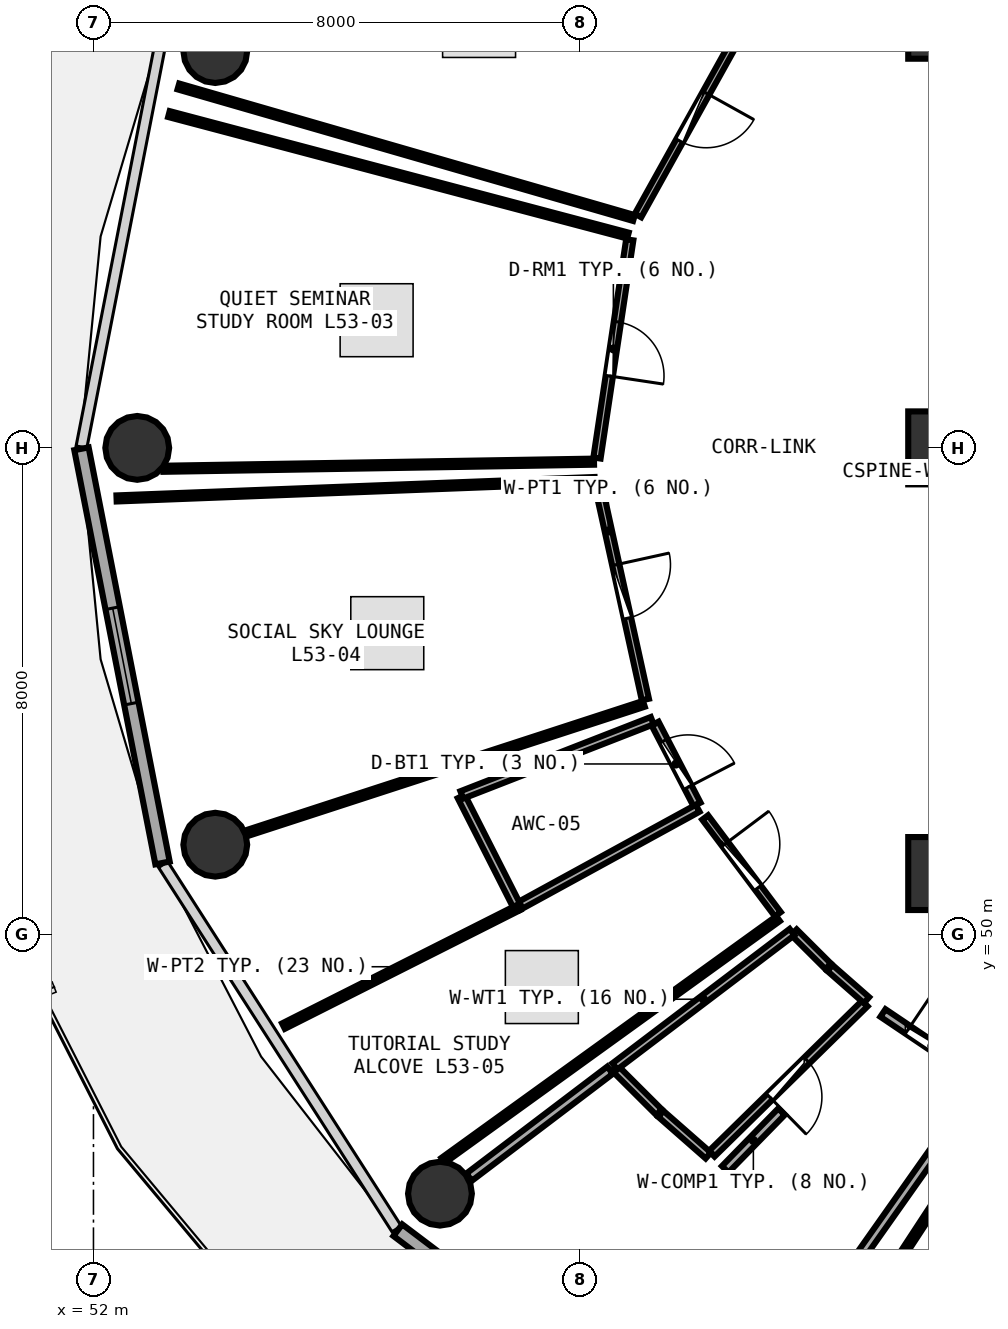
"""IFC4 building model, lengths in metres.
Left out: names, types, materials, properties, quantities, classifications, styles, units other than length and angle.
Written with IfcOpenShell. Run it as: python <this file> out.ifc"""

import sys

from ifc_helpers import new_model, si_unit, direction, frame, frame_2d, origin, origin_2d, place, context, subcontext, project, spatial, rectangle, circle, extrude, element, fill, save


model = new_model("IFC4")
c1 = context("Model", 3, precision=1e-05, world=origin(), true_north=direction((0.0, 1.0)))
c2 = subcontext(c1, "Body", "Model", "MODEL_VIEW")
j1 = project(units=[si_unit("LENGTHUNIT", "METRE"), si_unit("PLANEANGLEUNIT", "RADIAN")], contexts=[c1])
p1 = place(None, origin())
s1 = spatial("IfcSite", under=j1, at=p1, CompositionType="ELEMENT")
p2 = place(p1, origin())
s2 = spatial("IfcBuilding", under=s1, at=p2, CompositionType="ELEMENT")
p3 = place(p2, frame((0.0, 0.0, 208.2)))
s3 = spatial("IfcBuildingStorey", under=s2, at=p3, CompositionType="ELEMENT", Elevation=208.2)
for number, where, z_axis, x_axis in (
    (1, (66.0, 51.0, 0.0), (0.0, 0.0, 1.0), (1.0, 0.0, 0.0)),
    (2, (66.0, 65.0, 0.0), (0.0, 0.0, 1.0), (1.0, 0.0, 0.0)),
    (3, (66.0, 58.0, 0.0), (0.0, 0.0, 1.0), (1.0, 0.0, 0.0)),
):
    element("IfcColumn", number, at=place(p3, frame(where, z_axis=z_axis, x_axis=x_axis)), inside=s3, PredefinedType="PILASTER", context=c2, shape_type="SweptSolid", body=[
        extrude(rectangle(XDim=1.2, YDim=1.2, at=origin_2d()), origin(), (0.0, 0.0, 1.0), 3.75),
    ])
for number, where, z_axis, x_axis in (
    (4, (54.003, 64.526, 0.0), (0.0, 0.0, 1.0), (1.0, 0.0, 0.0)),
    (5, (52.72, 58.0, 0.0), (0.0, 0.0, 1.0), (1.0, 0.0, 0.0)),
    (6, (54.003, 51.474, 0.0), (0.0, 0.0, 1.0), (1.0, 0.0, 0.0)),
    (7, (57.698, 45.736, 0.0), (0.0, 0.0, 1.0), (1.0, 0.0, 0.0)),
):
    element("IfcColumn", number, at=place(p3, frame(where, z_axis=z_axis, x_axis=x_axis)), inside=s3, PredefinedType="COLUMN", context=c2, shape_type="SweptSolid", body=[
        extrude(circle(Radius=0.525, at=origin_2d()), origin(), (0.0, 0.0, 1.0), 3.75),
    ])
p4 = place(p3, frame((51.803, 57.985, 0.0), z_axis=(0.0, 0.0, 1.0), x_axis=(0.192069055673, -0.981381413036, 0.0)))
e8 = element("IfcWall", 8, at=p4, inside=s3, PredefinedType="SOLIDWALL", context=c2, shape_type="SweptSolid", body=[
    extrude(rectangle(XDim=6.94, YDim=0.24, at=frame_2d((3.47, 0.0))), origin(), (0.0, 0.0, 1.0), 3.475),
])
p5 = place(p4, frame((2.67, 0.0, 0.85)))
e9 = element("IfcOpeningElement", 9, at=p5, cuts=e8, PredefinedType="OPENING", context=c2, shape_type="SweptSolid", body=[
    extrude(rectangle(XDim=1.6, YDim=1.45, at=frame_2d((0.8, 0.725))), frame((0.0, 0.13, 0.0), z_axis=(0.0, -1.0, 0.0), x_axis=(1.0, 0.0, 0.0)), (0.0, 0.0, 1.0), 0.26),
])
p6 = place(p3, frame((57.006, 45.135, 0.0), z_axis=(0.0, 0.0, 1.0), x_axis=(0.797701674595, -0.603052268338, 0.0)))
e10 = element("IfcWall", 10, at=p6, inside=s3, PredefinedType="SOLIDWALL", context=c2, shape_type="SweptSolid", body=[
    extrude(rectangle(XDim=7.374, YDim=0.24, at=frame_2d((3.687, 0.0))), origin(), (0.0, 0.0, 1.0), 3.475),
])
p7 = place(p6, frame((2.887, 0.0, 0.85)))
e11 = element("IfcOpeningElement", 11, at=p7, cuts=e10, PredefinedType="OPENING", context=c2, shape_type="SweptSolid", body=[
    extrude(rectangle(XDim=1.6, YDim=1.45, at=frame_2d((0.8, 0.725))), frame((0.0, 0.13, 0.0), z_axis=(0.0, -1.0, 0.0), x_axis=(1.0, 0.0, 0.0)), (0.0, 0.0, 1.0), 0.26),
])
p8 = place(p3, frame((62.759, 65.064, 0.0), z_axis=(0.0, 0.0, 1.0), x_axis=(-0.485877595764, -0.874026865683, 0.0)))
e12 = element("IfcWall", 12, at=p8, inside=s3, PredefinedType="PARTITIONING", context=c2, shape_type="SweptSolid", body=[
    extrude(rectangle(XDim=3.71, YDim=0.12, at=frame_2d((1.855, 0.0))), origin(), (0.0, 0.0, 1.0), 3.025),
])
p9 = place(p8, frame((1.405, 0.0, 0.0)))
e13 = element("IfcOpeningElement", 13, at=p9, cuts=e12, PredefinedType="OPENING", context=c2, shape_type="SweptSolid", body=[
    extrude(rectangle(XDim=0.9, YDim=2.08, at=frame_2d((0.45, 1.04))), frame((0.0, 0.07, 0.0), z_axis=(0.0, -1.0, 0.0), x_axis=(1.0, 0.0, 0.0)), (0.0, 0.0, 1.0), 0.14),
])
p10 = place(p3, frame((60.82, 61.422, 0.0), z_axis=(0.0, 0.0, 1.0), x_axis=(-0.148557592641, -0.988903757536, 0.0)))
e14 = element("IfcWall", 14, at=p10, inside=s3, PredefinedType="PARTITIONING", context=c2, shape_type="SweptSolid", body=[
    extrude(rectangle(XDim=3.629, YDim=0.12, at=frame_2d((1.814, 0.0))), origin(), (0.0, 0.0, 1.0), 3.025),
])
p11 = place(p10, frame((1.364, 0.0, 0.0)))
e15 = element("IfcOpeningElement", 15, at=p11, cuts=e14, PredefinedType="OPENING", context=c2, shape_type="SweptSolid", body=[
    extrude(rectangle(XDim=0.9, YDim=2.08, at=frame_2d((0.45, 1.04))), frame((0.0, 0.07, 0.0), z_axis=(0.0, -1.0, 0.0), x_axis=(1.0, 0.0, 0.0)), (0.0, 0.0, 1.0), 0.14),
])
p12 = place(p3, frame((60.296, 57.414, 0.0), z_axis=(0.0, 0.0, 1.0), x_axis=(0.214769597133, -0.976664742963, 0.0)))
e16 = element("IfcWall", 16, at=p12, inside=s3, PredefinedType="PARTITIONING", context=c2, shape_type="SweptSolid", body=[
    extrude(rectangle(XDim=3.638, YDim=0.12, at=frame_2d((1.819, 0.0))), origin(), (0.0, 0.0, 1.0), 3.48),
])
p13 = place(p12, frame((1.369, 0.0, 0.0)))
e17 = element("IfcOpeningElement", 17, at=p13, cuts=e16, PredefinedType="OPENING", context=c2, shape_type="SweptSolid", body=[
    extrude(rectangle(XDim=0.9, YDim=2.08, at=frame_2d((0.45, 1.04))), frame((0.0, 0.07, 0.0), z_axis=(0.0, -1.0, 0.0), x_axis=(1.0, 0.0, 0.0)), (0.0, 0.0, 1.0), 0.14),
])
p14 = place(p3, frame((61.236, 53.468, 0.0), z_axis=(0.0, 0.0, 1.0), x_axis=(0.460573669508, -0.887621481802, 0.0)))
e18 = element("IfcWall", 18, at=p14, inside=s3, PredefinedType="PLUMBINGWALL", context=c2, shape_type="SweptSolid", body=[
    extrude(rectangle(XDim=1.5, YDim=0.13, at=frame_2d((0.75, 0.0))), origin(), (0.0, 0.0, 1.0), 3.235),
])
p15 = place(p14, frame((0.32, 0.0, 0.0)))
e19 = element("IfcOpeningElement", 19, at=p15, cuts=e18, PredefinedType="OPENING", context=c2, shape_type="SweptSolid", body=[
    extrude(rectangle(XDim=0.86, YDim=2.05, at=frame_2d((0.43, 1.025))), frame((0.0, 0.075, 0.0), z_axis=(0.0, -1.0, 0.0), x_axis=(1.0, 0.0, 0.0)), (0.0, 0.0, 1.0), 0.15),
])
p16 = place(p3, frame((62.06, 51.922, 0.0), z_axis=(0.0, 0.0, 1.0), x_axis=(0.600647163637, -0.799514218019, 0.0)))
e20 = element("IfcWall", 20, at=p16, inside=s3, PredefinedType="PARTITIONING", context=c2, shape_type="SweptSolid", body=[
    extrude(rectangle(XDim=1.991, YDim=0.12, at=frame_2d((0.996, 0.0))), origin(), (0.0, 0.0, 1.0), 3.025),
])
p17 = place(p16, frame((0.546, 0.0, 0.0)))
e21 = element("IfcOpeningElement", 21, at=p17, cuts=e20, PredefinedType="OPENING", context=c2, shape_type="SweptSolid", body=[
    extrude(rectangle(XDim=0.9, YDim=2.08, at=frame_2d((0.45, 1.04))), frame((0.0, 0.07, 0.0), z_axis=(0.0, -1.0, 0.0), x_axis=(1.0, 0.0, 0.0)), (0.0, 0.0, 1.0), 0.14),
])
p18 = place(p3, frame((64.686, 48.863, 0.0), z_axis=(0.0, 0.0, 1.0), x_axis=(-0.713685369918, -0.700466410875, 0.0)))
e22 = element("IfcWall", 22, at=p18, inside=s3, PredefinedType="PLUMBINGWALL", context=c2, shape_type="SweptSolid", body=[
    extrude(rectangle(XDim=3.528, YDim=0.13, at=frame_2d((1.764, 0.0))), origin(), (0.0, 0.0, 1.0), 3.175),
])
p19 = place(p18, frame((1.334, 0.0, 0.0)))
e23 = element("IfcOpeningElement", 23, at=p19, cuts=e22, PredefinedType="OPENING", context=c2, shape_type="SweptSolid", body=[
    extrude(rectangle(XDim=0.86, YDim=2.05, at=frame_2d((0.43, 1.025))), frame((0.0, 0.075, 0.0), z_axis=(0.0, -1.0, 0.0), x_axis=(1.0, 0.0, 0.0)), (0.0, 0.0, 1.0), 0.15),
])
p20 = place(p3, frame((64.984, 48.707, 0.0), z_axis=(0.0, 0.0, 1.0), x_axis=(0.829408373073, -0.558642775553, 0.0)))
e24 = element("IfcWall", 24, at=p20, inside=s3, PredefinedType="PARTITIONING", context=c2, shape_type="SweptSolid", body=[
    extrude(rectangle(XDim=1.94, YDim=0.15, at=frame_2d((0.97, 0.0))), origin(), (0.0, 0.0, 1.0), 3.025),
])
p21 = place(p20, frame((0.495, 0.0, 0.0)))
e25 = element("IfcOpeningElement", 25, at=p21, cuts=e24, PredefinedType="OPENING", context=c2, shape_type="SweptSolid", body=[
    extrude(rectangle(XDim=0.95, YDim=2.08, at=frame_2d((0.475, 1.04))), frame((0.0, 0.085, 0.0), z_axis=(0.0, -1.0, 0.0), x_axis=(1.0, 0.0, 0.0)), (0.0, 0.0, 1.0), 0.17),
])
p22 = place(p3, frame((63.514, 42.004, 0.0), z_axis=(0.0, 0.0, 1.0), x_axis=(0.547776057645, 0.836625000028, 0.0)))
e26 = element("IfcWall", 26, at=p22, inside=s3, PredefinedType="PARTITIONING", context=c2, shape_type="SweptSolid", body=[
    extrude(rectangle(XDim=6.381, YDim=0.1, at=frame_2d((3.19, 0.0))), origin(), (0.0, 0.0, 1.0), 3.025),
])
p23 = place(p3, frame((60.889, 61.78, 0.0), z_axis=(0.0, 0.0, 1.0), x_axis=(-0.960734399679, 0.277469661899, 0.0)))
e27 = element("IfcWall", 27, at=p23, inside=s3, PredefinedType="PARTITIONING", context=c2, shape_type="SweptSolid", body=[
    extrude(rectangle(XDim=7.798, YDim=0.1, at=frame_2d((3.899, 0.0))), origin(), (0.0, 0.0, 1.0), 3.075),
])
p24 = place(p3, frame((60.232, 57.773, 0.0), z_axis=(0.0, 0.0, 1.0), x_axis=(-0.999864271248, -0.016475408379, 0.0)))
e28 = element("IfcWall", 28, at=p24, inside=s3, PredefinedType="PARTITIONING", context=c2, shape_type="SweptSolid", body=[
    extrude(rectangle(XDim=7.083, YDim=0.1, at=frame_2d((3.542, 0.0))), origin(), (0.0, 0.0, 1.0), 3.175),
])
p25 = place(p3, frame((53.241, 63.49, 0.0), z_axis=(0.0, 0.0, 1.0), x_axis=(0.966701361123, -0.25590716755, 0.0)))
e29 = element("IfcWall", 29, at=p25, inside=s3, PredefinedType="PARTITIONING", context=c2, shape_type="SweptSolid", body=[
    extrude(rectangle(XDim=7.81, YDim=0.1, at=frame_2d((3.905, 0.0))), origin(), (0.0, 0.0, 1.0), 3.075),
])
p26 = place(p3, frame((61.052, 53.791, 0.0), z_axis=(0.0, 0.0, 1.0), x_axis=(-0.950863645771, -0.309609959708, 0.0)))
e30 = element("IfcWall", 30, at=p26, inside=s3, PredefinedType="PARTITIONING", context=c2, shape_type="SweptSolid", body=[
    extrude(rectangle(XDim=6.87, YDim=0.1, at=frame_2d((3.435, 0.0))), origin(), (0.0, 0.0, 1.0), 3.175),
])
p27 = place(p3, frame((52.38, 57.168, 0.0), z_axis=(0.0, 0.0, 1.0), x_axis=(0.999258468257, 0.038503423452, 0.0)))
e31 = element("IfcWall", 31, at=p27, inside=s3, PredefinedType="PARTITIONING", context=c2, shape_type="SweptSolid", body=[
    extrude(rectangle(XDim=7.869, YDim=0.1, at=frame_2d((3.935, 0.0))), origin(), (0.0, 0.0, 1.0), 3.075),
])
p28 = place(p3, frame((61.937, 52.073, 0.0), z_axis=(0.0, 0.0, 1.0), x_axis=(-0.877295143091, -0.479951280767, 0.0)))
e32 = element("IfcWall", 32, at=p28, inside=s3, PredefinedType="PLUMBINGWALL", context=c2, shape_type="SweptSolid", body=[
    extrude(rectangle(XDim=3.36, YDim=0.13, at=frame_2d((1.68, 0.0))), origin(), (0.0, 0.0, 1.0), 3.025),
])
p29 = place(p3, frame((58.962, 50.469, 0.0), z_axis=(0.0, 0.0, 1.0), x_axis=(-0.452384505313, 0.891822997771, 0.0)))
e33 = element("IfcWall", 33, at=p29, inside=s3, PredefinedType="PLUMBINGWALL", context=c2, shape_type="SweptSolid", body=[
    extrude(rectangle(XDim=2.018, YDim=0.13, at=frame_2d((1.009, 0.0))), origin(), (0.0, 0.0, 1.0), 3.025),
])
p30 = place(p3, frame((58.059, 52.293, 0.0), z_axis=(0.0, 0.0, 1.0), x_axis=(0.931712585556, 0.363196445352, 0.0)))
e34 = element("IfcWall", 34, at=p30, inside=s3, PredefinedType="PLUMBINGWALL", context=c2, shape_type="SweptSolid", body=[
    extrude(rectangle(XDim=3.36, YDim=0.13, at=frame_2d((1.68, 0.0))), origin(), (0.0, 0.0, 1.0), 3.175),
])
p31 = place(p3, frame((63.26, 50.259, 0.0), z_axis=(0.0, 0.0, 1.0), x_axis=(-0.810850730514, -0.585253016076, 0.0)))
e35 = element("IfcWall", 35, at=p31, inside=s3, PredefinedType="PARTITIONING", context=c2, shape_type="SweptSolid", body=[
    extrude(rectangle(XDim=6.793, YDim=0.1, at=frame_2d((3.396, 0.0))), origin(), (0.0, 0.0, 1.0), 3.175),
])
p32 = place(p3, frame((55.125, 48.491, 0.0), z_axis=(0.0, 0.0, 1.0), x_axis=(0.892902240534, 0.450250584507, 0.0)))
e36 = element("IfcWall", 36, at=p32, inside=s3, PredefinedType="PARTITIONING", context=c2, shape_type="SweptSolid", body=[
    extrude(rectangle(XDim=4.337, YDim=0.1, at=frame_2d((2.169, 0.0))), origin(), (0.0, 0.0, 1.0), 3.075),
])
p33 = place(p3, frame((63.519, 50.036, 0.0), z_axis=(0.0, 0.0, 1.0), x_axis=(0.708179895313, -0.706032036012, 0.0)))
e37 = element("IfcWall", 37, at=p33, inside=s3, PredefinedType="PLUMBINGWALL", context=c2, shape_type="SweptSolid", body=[
    extrude(rectangle(XDim=0.796, YDim=0.13, at=frame_2d((0.398, 0.0))), origin(), (0.0, 0.0, 1.0), 3.025),
])
p34 = place(p3, frame((64.112, 49.447, 0.0), z_axis=(0.0, 0.0, 1.0), x_axis=(0.751480759656, -0.659755005943, 0.0)))
e38 = element("IfcWall", 38, at=p34, inside=s3, PredefinedType="PLUMBINGWALL", context=c2, shape_type="SweptSolid", body=[
    extrude(rectangle(XDim=0.801, YDim=0.13, at=frame_2d((0.401, 0.0))), origin(), (0.0, 0.0, 1.0), 3.48),
])
p35 = place(p3, frame((62.111, 46.363, 0.0), z_axis=(0.0, 0.0, 1.0), x_axis=(-0.751599507382, 0.659619724162, 0.0)))
e39 = element("IfcWall", 39, at=p35, inside=s3, PredefinedType="PLUMBINGWALL", context=c2, shape_type="SweptSolid", body=[
    extrude(rectangle(XDim=1.038, YDim=0.13, at=frame_2d((0.519, 0.0))), origin(), (0.0, 0.0, 1.0), 3.48),
])
p36 = place(p3, frame((61.302, 47.075, 0.0), z_axis=(0.0, 0.0, 1.0), x_axis=(-0.707936648292, 0.706275938996, 0.0)))
e40 = element("IfcWall", 40, at=p36, inside=s3, PredefinedType="PLUMBINGWALL", context=c2, shape_type="SweptSolid", body=[
    extrude(rectangle(XDim=1.029, YDim=0.13, at=frame_2d((0.515, 0.0))), origin(), (0.0, 0.0, 1.0), 3.025),
])
p37 = place(p3, frame((60.575, 47.828, 0.0), z_axis=(0.0, 0.0, 1.0), x_axis=(0.79681650582, 0.604221363453, 0.0)))
e41 = element("IfcWall", 41, at=p37, inside=s3, PredefinedType="PLUMBINGWALL", context=c2, shape_type="SweptSolid", body=[
    extrude(rectangle(XDim=3.657, YDim=0.13, at=frame_2d((1.829, 0.0))), origin(), (0.0, 0.0, 1.0), 3.175),
])
p38 = place(p3, frame((66.62, 47.556, 0.0), z_axis=(0.0, 0.0, 1.0), x_axis=(-0.576552043051, -0.817060427174, 0.0)))
e42 = element("IfcWall", 42, at=p38, inside=s3, PredefinedType="PARTITIONING", context=c2, shape_type="SweptSolid", body=[
    extrude(rectangle(XDim=7.309, YDim=0.15, at=frame_2d((3.654, 0.0))), origin(), (0.0, 0.0, 1.0), 3.025),
])
p39 = place(p3, frame((58.177, 46.007, 0.0), z_axis=(0.0, 0.0, 1.0), x_axis=(0.796666201995, 0.604419525329, 0.0)))
e43 = element("IfcWall", 43, at=p39, inside=s3, PredefinedType="PARTITIONING", context=c2, shape_type="SweptSolid", body=[
    extrude(rectangle(XDim=2.911, YDim=0.15, at=frame_2d((1.455, 0.0))), origin(), (0.0, 0.0, 1.0), 3.025),
])
p40 = place(p3, frame((62.39, 46.137, 0.0), z_axis=(0.0, 0.0, 1.0), x_axis=(0.699044346204, 0.715078318816, 0.0)))
e44 = element("IfcWall", 44, at=p40, inside=s3, PredefinedType="PARTITIONING", context=c2, shape_type="SweptSolid", body=[
    extrude(rectangle(XDim=1.325, YDim=0.15, at=frame_2d((0.662, 0.0))), origin(), (0.0, 0.0, 1.0), 3.175),
])
p41 = place(p5, origin())
e45 = element("IfcWindow", 45, at=p41, inside=s3, PartitioningType="SINGLE_PANEL", PredefinedType="WINDOW", context=c2, shape_type="SweptSolid", body=[
    extrude(rectangle(XDim=1.6, YDim=1.45, at=frame_2d((0.8, 0.725))), frame((0.0, 0.03, 0.0), z_axis=(0.0, -1.0, 0.0), x_axis=(1.0, 0.0, 0.0)), (0.0, 0.0, 1.0), 0.06),
])
fill(e9, e45)
p42 = place(p9, origin())
e46 = element("IfcDoor", 46, at=p42, inside=s3, OperationType="SINGLE_SWING_LEFT", PredefinedType="DOOR", context=c2, shape_type="SweptSolid", body=[
    extrude(rectangle(XDim=0.9, YDim=2.08, at=frame_2d((0.45, 1.04))), frame((0.0, 0.025, 0.0), z_axis=(0.0, -1.0, 0.0), x_axis=(1.0, 0.0, 0.0)), (0.0, 0.0, 1.0), 0.05),
])
fill(e13, e46)
p43 = place(p11, origin())
e47 = element("IfcDoor", 47, at=p43, inside=s3, OperationType="SINGLE_SWING_RIGHT", PredefinedType="DOOR", context=c2, shape_type="SweptSolid", body=[
    extrude(rectangle(XDim=0.9, YDim=2.08, at=frame_2d((0.45, 1.04))), frame((0.0, 0.025, 0.0), z_axis=(0.0, -1.0, 0.0), x_axis=(1.0, 0.0, 0.0)), (0.0, 0.0, 1.0), 0.05),
])
fill(e15, e47)
p44 = place(p13, origin())
e48 = element("IfcDoor", 48, at=p44, inside=s3, OperationType="SINGLE_SWING_LEFT", PredefinedType="DOOR", context=c2, shape_type="SweptSolid", body=[
    extrude(rectangle(XDim=0.9, YDim=2.08, at=frame_2d((0.45, 1.04))), frame((0.0, 0.025, 0.0), z_axis=(0.0, -1.0, 0.0), x_axis=(1.0, 0.0, 0.0)), (0.0, 0.0, 1.0), 0.05),
])
fill(e17, e48)
p45 = place(p15, origin())
e49 = element("IfcDoor", 49, at=p45, inside=s3, OperationType="SINGLE_SWING_RIGHT", PredefinedType="DOOR", context=c2, shape_type="SweptSolid", body=[
    extrude(rectangle(XDim=0.86, YDim=2.05, at=frame_2d((0.43, 1.025))), frame((0.0, 0.025, 0.0), z_axis=(0.0, -1.0, 0.0), x_axis=(1.0, 0.0, 0.0)), (0.0, 0.0, 1.0), 0.05),
])
fill(e19, e49)
p46 = place(p17, origin())
e50 = element("IfcDoor", 50, at=p46, inside=s3, OperationType="SINGLE_SWING_LEFT", PredefinedType="DOOR", context=c2, shape_type="SweptSolid", body=[
    extrude(rectangle(XDim=0.9, YDim=2.08, at=frame_2d((0.45, 1.04))), frame((0.0, 0.025, 0.0), z_axis=(0.0, -1.0, 0.0), x_axis=(1.0, 0.0, 0.0)), (0.0, 0.0, 1.0), 0.05),
])
fill(e21, e50)
p47 = place(p19, origin())
e51 = element("IfcDoor", 51, at=p47, inside=s3, OperationType="SINGLE_SWING_RIGHT", PredefinedType="DOOR", context=c2, shape_type="SweptSolid", body=[
    extrude(rectangle(XDim=0.86, YDim=2.05, at=frame_2d((0.43, 1.025))), frame((0.0, 0.025, 0.0), z_axis=(0.0, -1.0, 0.0), x_axis=(1.0, 0.0, 0.0)), (0.0, 0.0, 1.0), 0.05),
])
fill(e23, e51)
p48 = place(p21, origin())
e52 = element("IfcDoor", 52, at=p48, inside=s3, OperationType="SINGLE_SWING_LEFT", PredefinedType="DOOR", context=c2, shape_type="SweptSolid", body=[
    extrude(rectangle(XDim=0.95, YDim=2.08, at=frame_2d((0.475, 1.04))), frame((0.0, 0.025, 0.0), z_axis=(0.0, -1.0, 0.0), x_axis=(1.0, 0.0, 0.0)), (0.0, 0.0, 1.0), 0.05),
])
fill(e25, e52)
save(model, sys.argv[1])
